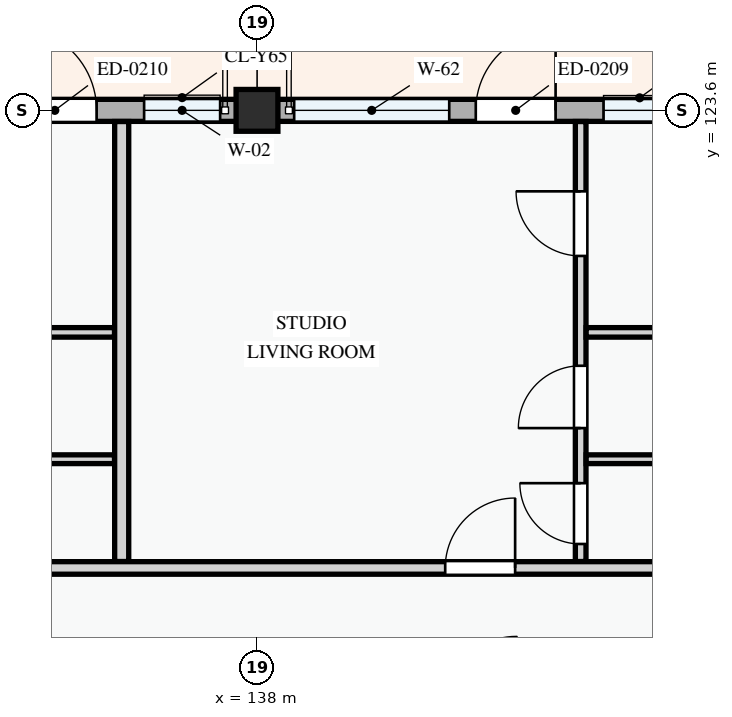
"""IFC4 building model, lengths in metres.
Left out: names, types, materials, properties, quantities, classifications, styles, units other than length and angle.
Written with IfcOpenShell. Run it as: python <this file> out.ifc"""

import sys

from ifc_helpers import new_model, si_unit, direction, frame, frame_2d, origin, origin_2d, place, context, subcontext, project, spatial, rectangle, extrude, element, fill, save


model = new_model("IFC4")
c1 = context("Model", 3, precision=1e-05, world=origin(), true_north=direction((0.0, 1.0)))
c2 = subcontext(c1, "Body", "Model", "MODEL_VIEW")
j1 = project(units=[si_unit("LENGTHUNIT", "METRE"), si_unit("PLANEANGLEUNIT", "RADIAN")], contexts=[c1])
p1 = place(None, origin())
s1 = spatial("IfcSite", under=j1, at=p1, CompositionType="ELEMENT")
p2 = place(p1, origin())
s2 = spatial("IfcBuilding", under=s1, at=p2, CompositionType="ELEMENT")
p3 = place(p2, frame((0.0, 0.0, 24.6)))
s3 = spatial("IfcBuildingStorey", under=s2, at=p3, CompositionType="ELEMENT", Elevation=24.6)
p4 = place(p3, frame((138.0, 123.6, 0.0), z_axis=(0.0, 0.0, 1.0), x_axis=(1.0, 0.0, 0.0)))
e1 = element("IfcColumn", 1, at=p4, inside=s3, PredefinedType="COLUMN", context=c2, shape_type="SweptSolid", body=[
    extrude(rectangle(XDim=0.55, YDim=0.55, at=origin_2d()), origin(), (0.0, 0.0, 1.0), 3.3),
])
p5 = place(p3, frame((144.0, 123.6, 0.0), z_axis=(0.0, 0.0, 1.0), x_axis=(-1.0, 0.0, 0.0)))
e2 = element("IfcWall", 2, at=p5, inside=s3, PredefinedType="STANDARD", context=c2, shape_type="SweptSolid", body=[
    extrude(rectangle(XDim=6.0, YDim=0.29, at=frame_2d((3.0, 0.0))), origin(), (0.0, 0.0, 1.0), 2.475),
])
p6 = place(p5, frame((2.072, 0.0, 0.0)))
e3 = element("IfcOpeningElement", 3, at=p6, cuts=e2, PredefinedType="OPENING", context=c2, shape_type="SweptSolid", body=[
    extrude(rectangle(XDim=1.05, YDim=2.15, at=frame_2d((0.525, 1.075))), frame((0.0, 0.155, 0.0), z_axis=(0.0, -1.0, 0.0), x_axis=(1.0, 0.0, 0.0)), (0.0, 0.0, 1.0), 0.31),
])
p7 = place(p5, frame((0.491, 0.0, 0.78)))
e4 = element("IfcOpeningElement", 4, at=p7, cuts=e2, PredefinedType="OPENING", context=c2, shape_type="SweptSolid", body=[
    extrude(rectangle(XDim=0.95, YDim=1.15, at=frame_2d((0.475, 0.575))), frame((0.0, 0.155, 0.0), z_axis=(0.0, -1.0, 0.0), x_axis=(1.0, 0.0, 0.0)), (0.0, 0.0, 1.0), 0.31),
])
p8 = place(p5, frame((3.471, 0.0, 0.78)))
e5 = element("IfcOpeningElement", 5, at=p8, cuts=e2, PredefinedType="OPENING", context=c2, shape_type="SweptSolid", body=[
    extrude(rectangle(XDim=2.04, YDim=1.46, at=frame_2d((1.02, 0.73))), frame((0.0, 0.155, 0.0), z_axis=(0.0, -1.0, 0.0), x_axis=(1.0, 0.0, 0.0)), (0.0, 0.0, 1.0), 0.31),
])
p9 = place(p3, frame((138.0, 123.6, 0.0), z_axis=(0.0, 0.0, 1.0), x_axis=(-1.0, 0.0, 0.0)))
e6 = element("IfcWall", 6, at=p9, inside=s3, PredefinedType="STANDARD", context=c2, shape_type="SweptSolid", body=[
    extrude(rectangle(XDim=8.4, YDim=0.29, at=frame_2d((4.2, 0.0))), origin(), (0.0, 0.0, 1.0), 2.375),
])
p10 = place(p9, frame((2.11, 0.0, 0.0)))
e7 = element("IfcOpeningElement", 7, at=p10, cuts=e6, PredefinedType="OPENING", context=c2, shape_type="SweptSolid", body=[
    extrude(rectangle(XDim=1.1, YDim=2.15, at=frame_2d((0.55, 1.075))), frame((0.0, 0.155, 0.0), z_axis=(0.0, -1.0, 0.0), x_axis=(1.0, 0.0, 0.0)), (0.0, 0.0, 1.0), 0.31),
])
p11 = place(p9, frame((0.485, 0.0, 0.78)))
e8 = element("IfcOpeningElement", 8, at=p11, cuts=e6, PredefinedType="OPENING", context=c2, shape_type="SweptSolid", body=[
    extrude(rectangle(XDim=1.0, YDim=1.25, at=frame_2d((0.5, 0.625))), frame((0.0, 0.155, 0.0), z_axis=(0.0, -1.0, 0.0), x_axis=(1.0, 0.0, 0.0)), (0.0, 0.0, 1.0), 0.31),
])
p12 = place(p9, frame((3.883, 0.0, 0.78)))
e9 = element("IfcOpeningElement", 9, at=p12, cuts=e6, PredefinedType="OPENING", context=c2, shape_type="SweptSolid", body=[
    extrude(rectangle(XDim=1.3, YDim=1.4, at=frame_2d((0.65, 0.7))), frame((0.0, 0.155, 0.0), z_axis=(0.0, -1.0, 0.0), x_axis=(1.0, 0.0, 0.0)), (0.0, 0.0, 1.0), 0.31),
])
p13 = place(p9, frame((6.312, 0.0, 0.78)))
e10 = element("IfcOpeningElement", 10, at=p13, cuts=e6, PredefinedType="OPENING", context=c2, shape_type="SweptSolid", body=[
    extrude(rectangle(XDim=1.25, YDim=1.3, at=frame_2d((0.625, 0.65))), frame((0.0, 0.155, 0.0), z_axis=(0.0, -1.0, 0.0), x_axis=(1.0, 0.0, 0.0)), (0.0, 0.0, 1.0), 0.31),
])
p14 = place(p3, frame((127.561, 120.679, 0.0), z_axis=(0.0, 0.0, 1.0), x_axis=(1.0, 0.0, 0.0)))
e11 = element("IfcWall", 11, at=p14, inside=s3, PredefinedType="PARTITIONING", context=c2, shape_type="SweptSolid", body=[
    extrude(rectangle(XDim=8.564, YDim=0.125, at=frame_2d((4.282, 0.0))), origin(), (0.0, 0.0, 1.0), 3.0),
])
p15 = place(p3, frame((127.561, 119.01, 0.0), z_axis=(0.0, 0.0, 1.0), x_axis=(1.0, 0.0, 0.0)))
e12 = element("IfcWall", 12, at=p15, inside=s3, PredefinedType="PARTITIONING", context=c2, shape_type="SweptSolid", body=[
    extrude(rectangle(XDim=8.564, YDim=0.115, at=frame_2d((4.282, 0.0))), origin(), (0.0, 0.0, 1.0), 3.0),
])
p16 = place(p3, frame((142.258, 117.665, 0.0), z_axis=(0.0, 0.0, 1.0), x_axis=(0.0, 1.0, 0.0)))
e13 = element("IfcWall", 13, at=p16, inside=s3, PredefinedType="PARTITIONING", context=c2, shape_type="SweptSolid", body=[
    extrude(rectangle(XDim=5.788, YDim=0.14, at=frame_2d((2.894, 0.0))), origin(), (0.0, 0.0, 1.0), 3.0),
])
p17 = place(p16, frame((0.231, 0.0, 0.0)))
e14 = element("IfcOpeningElement", 14, at=p17, cuts=e13, PredefinedType="OPENING", context=c2, shape_type="SweptSolid", body=[
    extrude(rectangle(XDim=0.8, YDim=2.1, at=frame_2d((0.4, 1.05))), frame((0.0, 0.08, 0.0), z_axis=(0.0, -1.0, 0.0), x_axis=(1.0, 0.0, 0.0)), (0.0, 0.0, 1.0), 0.16),
])
p18 = place(p16, frame((1.755, 0.0, 0.0)))
e15 = element("IfcOpeningElement", 15, at=p18, cuts=e13, PredefinedType="OPENING", context=c2, shape_type="SweptSolid", body=[
    extrude(rectangle(XDim=0.82, YDim=2.08, at=frame_2d((0.41, 1.04))), frame((0.0, 0.08, 0.0), z_axis=(0.0, -1.0, 0.0), x_axis=(1.0, 0.0, 0.0)), (0.0, 0.0, 1.0), 0.16),
])
p19 = place(p16, frame((4.02, 0.0, 0.0)))
e16 = element("IfcOpeningElement", 16, at=p19, cuts=e13, PredefinedType="OPENING", context=c2, shape_type="SweptSolid", body=[
    extrude(rectangle(XDim=0.85, YDim=2.1, at=frame_2d((0.425, 1.05))), frame((0.0, 0.08, 0.0), z_axis=(0.0, -1.0, 0.0), x_axis=(1.0, 0.0, 0.0)), (0.0, 0.0, 1.0), 0.16),
])
p20 = place(p3, frame((142.33, 120.679, 0.0), z_axis=(0.0, 0.0, 1.0), x_axis=(1.0, 0.0, 0.0)))
e17 = element("IfcWall", 17, at=p20, inside=s3, PredefinedType="PARTITIONING", context=c2, shape_type="SweptSolid", body=[
    extrude(rectangle(XDim=7.72, YDim=0.125, at=frame_2d((3.86, 0.0))), origin(), (0.0, 0.0, 1.0), 3.0),
])
p21 = place(p3, frame((142.33, 119.01, 0.0), z_axis=(0.0, 0.0, 1.0), x_axis=(1.0, 0.0, 0.0)))
e18 = element("IfcWall", 18, at=p21, inside=s3, PredefinedType="PARTITIONING", context=c2, shape_type="SweptSolid", body=[
    extrude(rectangle(XDim=7.72, YDim=0.115, at=frame_2d((3.86, 0.0))), origin(), (0.0, 0.0, 1.0), 3.0),
])
p22 = place(p3, frame((136.22, 117.665, 0.0), z_axis=(0.0, 0.0, 1.0), x_axis=(0.0, 1.0, 0.0)))
e19 = element("IfcWall", 19, at=p22, inside=s3, PredefinedType="PARTITIONING", context=c2, shape_type="SweptSolid", body=[
    extrude(rectangle(XDim=5.788, YDim=0.185, at=frame_2d((2.894, 0.0))), origin(), (0.0, 0.0, 1.0), 3.0),
])
p23 = place(p3, frame((80.547, 117.58, 0.0), z_axis=(0.0, 0.0, 1.0), x_axis=(1.0, 0.0, 0.0)))
e20 = element("IfcWall", 20, at=p23, inside=s3, PredefinedType="PARTITIONING", context=c2, shape_type="SweptSolid", body=[
    extrude(rectangle(XDim=71.993, YDim=0.165, at=frame_2d((35.997, 0.0))), origin(), (0.0, 0.0, 1.0), 3.0),
])
p24 = place(p23, frame((2.262, 0.0, 0.0)))
e21 = element("IfcOpeningElement", 21, at=p24, cuts=e20, PredefinedType="OPENING", context=c2, shape_type="SweptSolid", body=[
    extrude(rectangle(XDim=0.92, YDim=2.1, at=frame_2d((0.46, 1.05))), frame((0.0, 0.093, 0.0), z_axis=(0.0, -1.0, 0.0), x_axis=(1.0, 0.0, 0.0)), (0.0, 0.0, 1.0), 0.185),
])
p25 = place(p23, frame((23.945, 0.0, 0.0)))
e22 = element("IfcOpeningElement", 22, at=p25, cuts=e20, PredefinedType="OPENING", context=c2, shape_type="SweptSolid", body=[
    extrude(rectangle(XDim=0.92, YDim=2.1, at=frame_2d((0.46, 1.05))), frame((0.0, 0.093, 0.0), z_axis=(0.0, -1.0, 0.0), x_axis=(1.0, 0.0, 0.0)), (0.0, 0.0, 1.0), 0.185),
])
p26 = place(p23, frame((39.133, 0.0, 0.0)))
e23 = element("IfcOpeningElement", 23, at=p26, cuts=e20, PredefinedType="OPENING", context=c2, shape_type="SweptSolid", body=[
    extrude(rectangle(XDim=0.92, YDim=2.1, at=frame_2d((0.46, 1.05))), frame((0.0, 0.093, 0.0), z_axis=(0.0, -1.0, 0.0), x_axis=(1.0, 0.0, 0.0)), (0.0, 0.0, 1.0), 0.185),
])
p27 = place(p23, frame((59.929, 0.0, 0.0)))
e24 = element("IfcOpeningElement", 24, at=p27, cuts=e20, PredefinedType="OPENING", context=c2, shape_type="SweptSolid", body=[
    extrude(rectangle(XDim=0.92, YDim=2.1, at=frame_2d((0.46, 1.05))), frame((0.0, 0.093, 0.0), z_axis=(0.0, -1.0, 0.0), x_axis=(1.0, 0.0, 0.0)), (0.0, 0.0, 1.0), 0.185),
])
p28 = place(p6, frame((1.05, 0.0, 0.0), z_axis=(0.0, 0.0, 1.0), x_axis=(-1.0, 0.0, 0.0)))
e25 = element("IfcDoor", 25, at=p28, inside=s3, OperationType="SINGLE_SWING_RIGHT", PredefinedType="DOOR", context=c2, shape_type="SweptSolid", body=[
    extrude(rectangle(XDim=1.05, YDim=2.15, at=frame_2d((0.525, 1.075))), frame((0.0, 0.025, 0.0), z_axis=(0.0, -1.0, 0.0), x_axis=(1.0, 0.0, 0.0)), (0.0, 0.0, 1.0), 0.05),
])
fill(e3, e25)
p29 = place(p7, origin())
e26 = element("IfcWindow", 26, at=p29, inside=s3, PartitioningType="SINGLE_PANEL", PredefinedType="WINDOW", context=c2, shape_type="SweptSolid", body=[
    extrude(rectangle(XDim=0.95, YDim=1.15, at=frame_2d((0.475, 0.575))), frame((0.0, 0.03, 0.0), z_axis=(0.0, -1.0, 0.0), x_axis=(1.0, 0.0, 0.0)), (0.0, 0.0, 1.0), 0.06),
])
fill(e4, e26)
p30 = place(p8, origin())
e27 = element("IfcWindow", 27, at=p30, inside=s3, PartitioningType="DOUBLE_PANEL_VERTICAL", PredefinedType="WINDOW", context=c2, shape_type="SweptSolid", body=[
    extrude(rectangle(XDim=2.04, YDim=1.46, at=frame_2d((1.02, 0.73))), frame((0.0, 0.03, 0.0), z_axis=(0.0, -1.0, 0.0), x_axis=(1.0, 0.0, 0.0)), (0.0, 0.0, 1.0), 0.06),
])
fill(e5, e27)
p31 = place(p10, frame((1.1, 0.0, 0.0), z_axis=(0.0, 0.0, 1.0), x_axis=(-1.0, 0.0, 0.0)))
e28 = element("IfcDoor", 28, at=p31, inside=s3, OperationType="SINGLE_SWING_LEFT", PredefinedType="DOOR", context=c2, shape_type="SweptSolid", body=[
    extrude(rectangle(XDim=1.1, YDim=2.15, at=frame_2d((0.55, 1.075))), frame((0.0, 0.025, 0.0), z_axis=(0.0, -1.0, 0.0), x_axis=(1.0, 0.0, 0.0)), (0.0, 0.0, 1.0), 0.05),
])
fill(e7, e28)
p32 = place(p11, origin())
e29 = element("IfcWindow", 29, at=p32, inside=s3, PartitioningType="SINGLE_PANEL", PredefinedType="WINDOW", context=c2, shape_type="SweptSolid", body=[
    extrude(rectangle(XDim=1.0, YDim=1.25, at=frame_2d((0.5, 0.625))), frame((0.0, 0.03, 0.0), z_axis=(0.0, -1.0, 0.0), x_axis=(1.0, 0.0, 0.0)), (0.0, 0.0, 1.0), 0.06),
])
fill(e8, e29)
p33 = place(p17, origin())
e30 = element("IfcDoor", 30, at=p33, inside=s3, OperationType="SINGLE_SWING_RIGHT", PredefinedType="DOOR", context=c2, shape_type="SweptSolid", body=[
    extrude(rectangle(XDim=0.8, YDim=2.1, at=frame_2d((0.4, 1.05))), frame((0.0, 0.025, 0.0), z_axis=(0.0, -1.0, 0.0), x_axis=(1.0, 0.0, 0.0)), (0.0, 0.0, 1.0), 0.05),
])
fill(e14, e30)
p34 = place(p18, origin())
e31 = element("IfcDoor", 31, at=p34, inside=s3, OperationType="SINGLE_SWING_LEFT", PredefinedType="DOOR", context=c2, shape_type="SweptSolid", body=[
    extrude(rectangle(XDim=0.82, YDim=2.08, at=frame_2d((0.41, 1.04))), frame((0.0, 0.025, 0.0), z_axis=(0.0, -1.0, 0.0), x_axis=(1.0, 0.0, 0.0)), (0.0, 0.0, 1.0), 0.05),
])
fill(e15, e31)
p35 = place(p19, origin())
e32 = element("IfcDoor", 32, at=p35, inside=s3, OperationType="SINGLE_SWING_RIGHT", PredefinedType="DOOR", context=c2, shape_type="SweptSolid", body=[
    extrude(rectangle(XDim=0.85, YDim=2.1, at=frame_2d((0.425, 1.05))), frame((0.0, 0.025, 0.0), z_axis=(0.0, -1.0, 0.0), x_axis=(1.0, 0.0, 0.0)), (0.0, 0.0, 1.0), 0.05),
])
fill(e16, e32)
p36 = place(p27, origin())
e33 = element("IfcDoor", 33, at=p36, inside=s3, OperationType="SINGLE_SWING_RIGHT", PredefinedType="DOOR", context=c2, shape_type="SweptSolid", body=[
    extrude(rectangle(XDim=0.92, YDim=2.1, at=frame_2d((0.46, 1.05))), frame((0.0, 0.025, 0.0), z_axis=(0.0, -1.0, 0.0), x_axis=(1.0, 0.0, 0.0)), (0.0, 0.0, 1.0), 0.05),
])
fill(e24, e33)
save(model, sys.argv[1])
